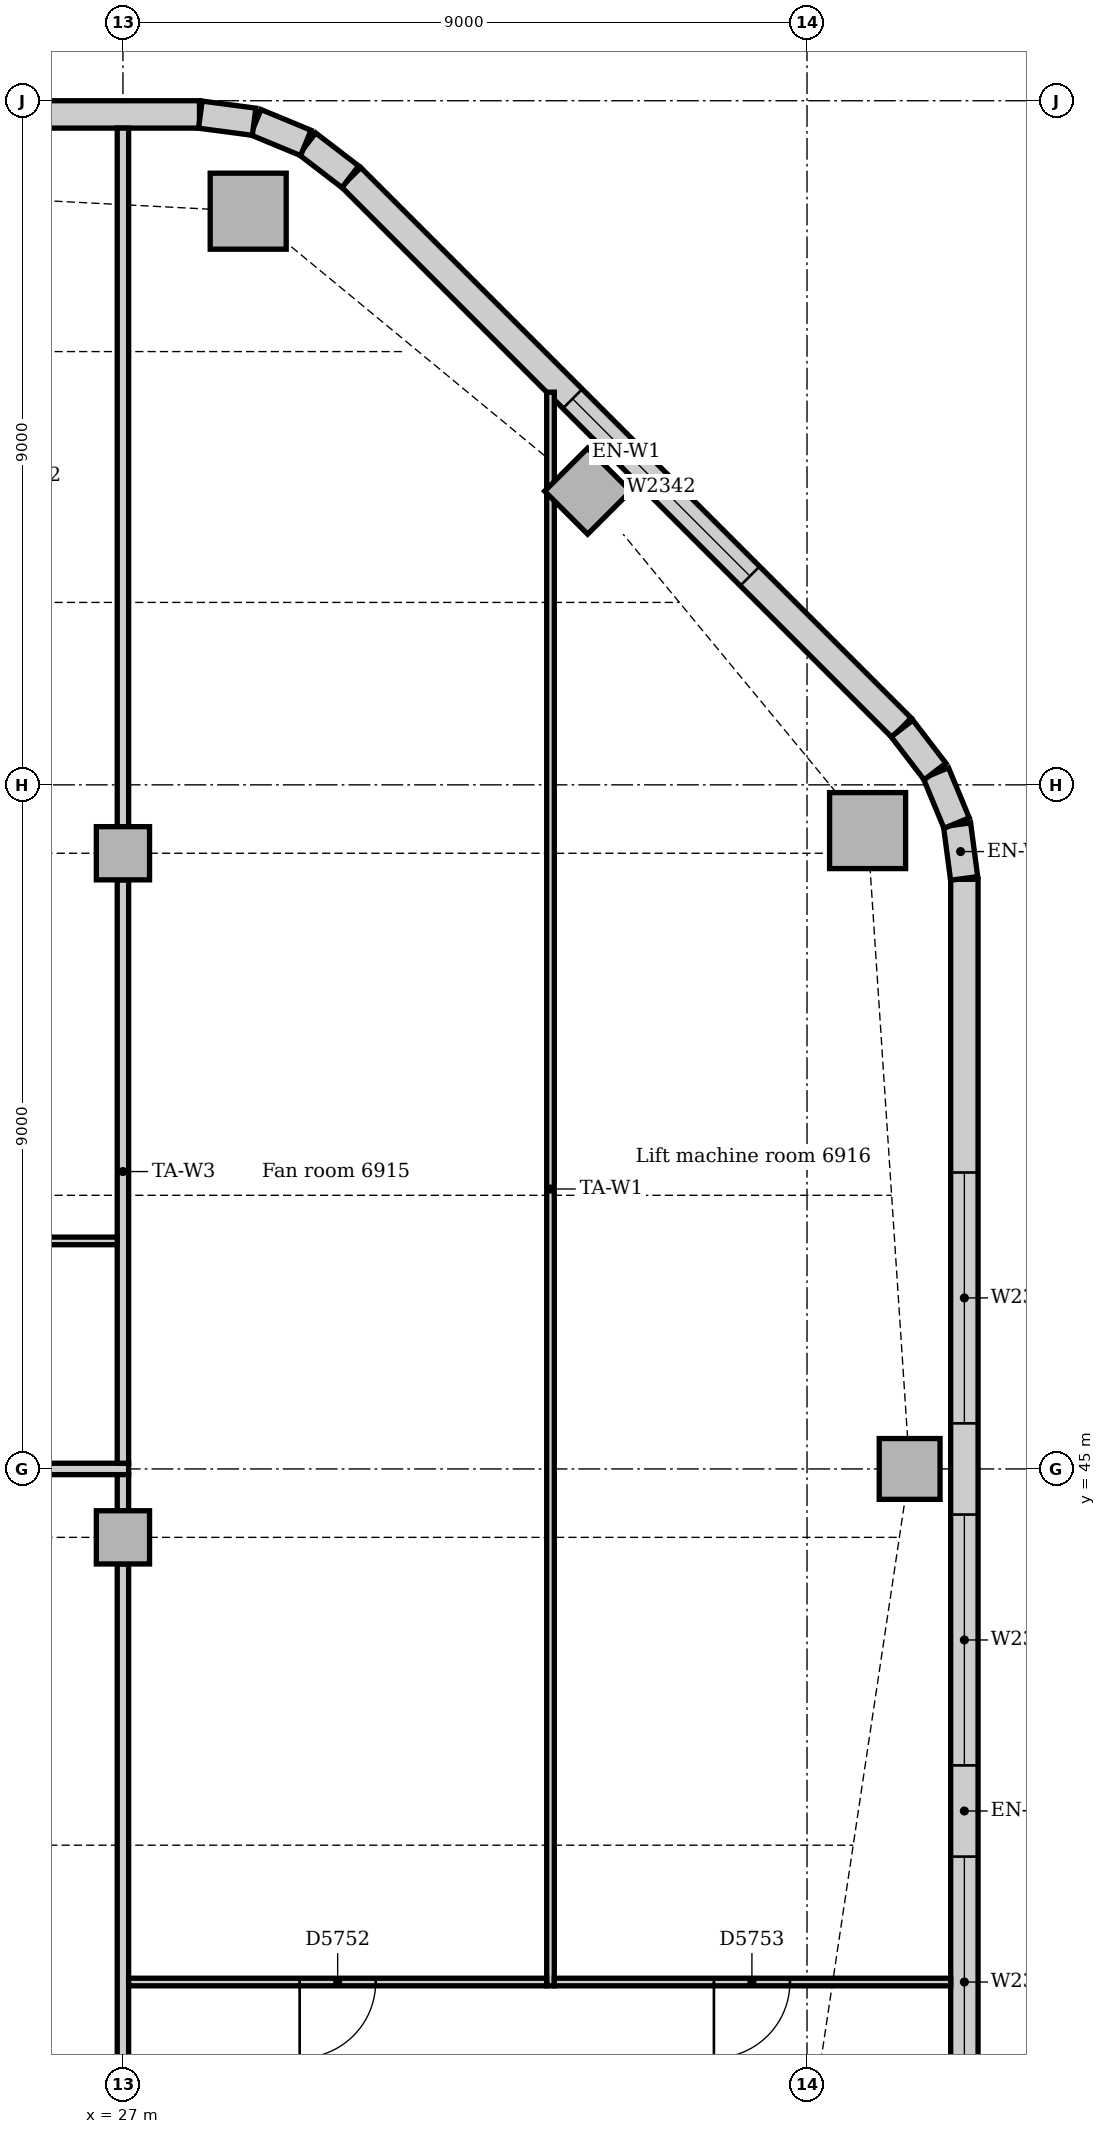
"""IFC4 building model, lengths in metres.
Left out: names, types, materials, properties, quantities, classifications, styles, units other than length and angle.
Written with IfcOpenShell. Run it as: python <this file> out.ifc"""

import sys

from ifc_helpers import new_model, si_unit, direction, frame, frame_2d, origin, origin_2d, place, context, subcontext, project, spatial, rectangle, extrude, element, fill, save


model = new_model("IFC4")
c1 = context("Model", 3, precision=1e-05, world=origin(), true_north=direction((0.0, 1.0)))
c2 = subcontext(c1, "Body", "Model", "MODEL_VIEW")
j1 = project(units=[si_unit("LENGTHUNIT", "METRE"), si_unit("PLANEANGLEUNIT", "RADIAN")], contexts=[c1])
p1 = place(None, origin())
s1 = spatial("IfcSite", under=j1, at=p1, CompositionType="ELEMENT")
p2 = place(p1, origin())
s2 = spatial("IfcBuilding", under=s1, at=p2, CompositionType="ELEMENT")
p3 = place(p2, frame((0.0, 0.0, 291.0)))
s3 = spatial("IfcBuildingStorey", under=s2, at=p3, CompositionType="ELEMENT", Elevation=291.0)
for number, where, z_axis, x_axis in (
    (1, (36.797, 53.398, 0.0), (0.0, 0.0, 1.0), (1.0, 0.0, 0.0)),
    (2, (28.648, 61.547, 0.0), (0.0, 0.0, 1.0), (1.0, 0.0, 0.0)),
):
    element("IfcColumn", number, at=place(p3, frame(where, z_axis=z_axis, x_axis=x_axis)), inside=s3, PredefinedType="COLUMN", context=c2, shape_type="SweptSolid", body=[
        extrude(rectangle(XDim=1.0, YDim=1.0, at=origin_2d()), origin(), (0.0, 0.0, 1.0), 6.55),
    ])
for number, where, z_axis, x_axis in (
    (3, (37.35, 45.0, 0.0), (0.0, 0.0, 1.0), (1.0, 0.0, 0.0)),
    (4, (33.114, 57.864, 0.0), (0.0, 0.0, 1.0), (0.707, 0.707, 0.0)),
):
    element("IfcColumn", number, at=place(p3, frame(where, z_axis=z_axis, x_axis=x_axis)), inside=s3, PredefinedType="COLUMN", context=c2, shape_type="SweptSolid", body=[
        extrude(rectangle(XDim=0.8, YDim=0.8, at=origin_2d()), origin(), (0.0, 0.0, 1.0), 6.55),
    ])
for number, where, z_axis, x_axis in (
    (5, (27.0, 44.1, 0.0), (0.0, 0.0, 1.0), (1.0, 0.0, 0.0)),
    (6, (27.0, 53.1, 0.0), (0.0, 0.0, 1.0), (1.0, 0.0, 0.0)),
):
    element("IfcColumn", number, at=place(p3, frame(where, z_axis=z_axis, x_axis=x_axis)), inside=s3, PredefinedType="COLUMN", context=c2, shape_type="SweptSolid", body=[
        extrude(rectangle(XDim=0.7, YDim=0.7, at=origin_2d()), origin(), (0.0, 0.0, 1.0), 6.55),
    ])
p4 = place(p3, frame((38.07, 28.243, 0.0), z_axis=(0.0, 0.0, 1.0), x_axis=(0.0, 1.0, 0.0)))
e7 = element("IfcWall", 7, at=p4, inside=s3, PredefinedType="STANDARD", context=c2, shape_type="SweptSolid", body=[
    extrude(rectangle(XDim=24.515, YDim=0.36, at=frame_2d((12.257, 0.0))), origin(), (0.0, 0.0, 1.0), 6.55),
])
p5 = place(p4, frame((3.857, 0.0, 0.9)))
e8 = element("IfcOpeningElement", 8, at=p5, cuts=e7, PredefinedType="OPENING", context=c2, shape_type="SweptSolid", body=[
    extrude(rectangle(XDim=3.3, YDim=2.2, at=frame_2d((1.65, 1.1))), frame((0.0, 0.19, 0.0), z_axis=(0.0, -1.0, 0.0), x_axis=(1.0, 0.0, 0.0)), (0.0, 0.0, 1.0), 0.38),
])
p6 = place(p4, frame((8.357, 0.0, 0.9)))
e9 = element("IfcOpeningElement", 9, at=p6, cuts=e7, PredefinedType="OPENING", context=c2, shape_type="SweptSolid", body=[
    extrude(rectangle(XDim=3.3, YDim=2.2, at=frame_2d((1.65, 1.1))), frame((0.0, 0.19, 0.0), z_axis=(0.0, -1.0, 0.0), x_axis=(1.0, 0.0, 0.0)), (0.0, 0.0, 1.0), 0.38),
])
p7 = place(p4, frame((12.857, 0.0, 0.9)))
e10 = element("IfcOpeningElement", 10, at=p7, cuts=e7, PredefinedType="OPENING", context=c2, shape_type="SweptSolid", body=[
    extrude(rectangle(XDim=3.3, YDim=2.2, at=frame_2d((1.65, 1.1))), frame((0.0, 0.19, 0.0), z_axis=(0.0, -1.0, 0.0), x_axis=(1.0, 0.0, 0.0)), (0.0, 0.0, 1.0), 0.38),
])
p8 = place(p4, frame((17.357, 0.0, 0.9)))
e11 = element("IfcOpeningElement", 11, at=p8, cuts=e7, PredefinedType="OPENING", context=c2, shape_type="SweptSolid", body=[
    extrude(rectangle(XDim=3.3, YDim=2.2, at=frame_2d((1.65, 1.1))), frame((0.0, 0.19, 0.0), z_axis=(0.0, -1.0, 0.0), x_axis=(1.0, 0.0, 0.0)), (0.0, 0.0, 1.0), 0.38),
])
p9 = place(p3, frame((37.244, 54.751, 0.0), z_axis=(0.0, 0.0, 1.0), x_axis=(-0.707106781187, 0.707106781187, 0.0)))
e12 = element("IfcWall", 12, at=p9, inside=s3, PredefinedType="STANDARD", context=c2, shape_type="SweptSolid", body=[
    extrude(rectangle(XDim=10.243, YDim=0.36, at=frame_2d((5.121, 0.0))), origin(), (0.0, 0.0, 1.0), 6.55),
])
p10 = place(p9, frame((2.821, 0.0, 0.9)))
e13 = element("IfcOpeningElement", 13, at=p10, cuts=e12, PredefinedType="OPENING", context=c2, shape_type="SweptSolid", body=[
    extrude(rectangle(XDim=3.3, YDim=2.2, at=frame_2d((1.65, 1.1))), frame((0.0, 0.19, 0.0), z_axis=(0.0, -1.0, 0.0), x_axis=(1.0, 0.0, 0.0)), (0.0, 0.0, 1.0), 0.38),
])
p11 = place(p3, frame((28.007, 62.82, 0.0), z_axis=(0.0, 0.0, 1.0), x_axis=(-1.0, 0.0, 0.0)))
e14 = element("IfcWall", 14, at=p11, inside=s3, PredefinedType="STANDARD", context=c2, shape_type="SweptSolid", body=[
    extrude(rectangle(XDim=23.765, YDim=0.36, at=frame_2d((11.882, 0.0))), origin(), (0.0, 0.0, 1.0), 6.55),
])
p12 = place(p11, frame((3.532, 0.0, 0.9)))
e15 = element("IfcOpeningElement", 15, at=p12, cuts=e14, PredefinedType="OPENING", context=c2, shape_type="SweptSolid", body=[
    extrude(rectangle(XDim=1.8, YDim=2.2, at=frame_2d((0.9, 1.1))), frame((0.0, 0.19, 0.0), z_axis=(0.0, -1.0, 0.0), x_axis=(1.0, 0.0, 0.0)), (0.0, 0.0, 1.0), 0.38),
])
p13 = place(p11, frame((7.982, 0.0, 0.9)))
e16 = element("IfcOpeningElement", 16, at=p13, cuts=e14, PredefinedType="OPENING", context=c2, shape_type="SweptSolid", body=[
    extrude(rectangle(XDim=3.3, YDim=2.2, at=frame_2d((1.65, 1.1))), frame((0.0, 0.19, 0.0), z_axis=(0.0, -1.0, 0.0), x_axis=(1.0, 0.0, 0.0)), (0.0, 0.0, 1.0), 0.38),
])
p14 = place(p11, frame((12.532, 0.0, 0.9)))
e17 = element("IfcOpeningElement", 17, at=p14, cuts=e14, PredefinedType="OPENING", context=c2, shape_type="SweptSolid", body=[
    extrude(rectangle(XDim=1.8, YDim=2.2, at=frame_2d((0.9, 1.1))), frame((0.0, 0.19, 0.0), z_axis=(0.0, -1.0, 0.0), x_axis=(1.0, 0.0, 0.0)), (0.0, 0.0, 1.0), 0.38),
])
p15 = place(p11, frame((16.982, 0.0, 0.9)))
e18 = element("IfcOpeningElement", 18, at=p15, cuts=e14, PredefinedType="OPENING", context=c2, shape_type="SweptSolid", body=[
    extrude(rectangle(XDim=3.3, YDim=2.2, at=frame_2d((1.65, 1.1))), frame((0.0, 0.19, 0.0), z_axis=(0.0, -1.0, 0.0), x_axis=(1.0, 0.0, 0.0)), (0.0, 0.0, 1.0), 0.38),
])
for number, where, z_axis, x_axis in (
    (19, (38.067, 52.769, 0.0), (0.0, 0.0, 1.0), (-0.131, 0.991, 0.0)),
    (20, (37.968, 53.497, 0.0), (0.0, 0.0, 1.0), (-0.383, 0.924, 0.0)),
):
    element("IfcWall", number, at=place(p3, frame(where, z_axis=z_axis, x_axis=x_axis)), inside=s3, PredefinedType="STANDARD", context=c2, shape_type="SweptSolid", body=[
        extrude(rectangle(XDim=0.713, YDim=0.36, at=frame_2d((0.356, 0.0))), origin(), (0.0, 0.0, 1.0), 6.55),
    ])
for number, where, z_axis, x_axis in (
    (21, (37.684, 54.175, 0.0), (0.0, 0.0, 1.0), (-0.609, 0.793, 0.0)),
    (22, (29.991, 62.0, 0.0), (0.0, 0.0, 1.0), (-0.793, 0.609, 0.0)),
):
    element("IfcWall", number, at=place(p3, frame(where, z_axis=z_axis, x_axis=x_axis)), inside=s3, PredefinedType="STANDARD", context=c2, shape_type="SweptSolid", body=[
        extrude(rectangle(XDim=0.713, YDim=0.36, at=frame_2d((0.357, 0.0))), origin(), (0.0, 0.0, 1.0), 6.55),
    ])
for number, where, z_axis, x_axis in (
    (23, (29.406, 62.445, 0.0), (0.0, 0.0, 1.0), (-0.924, 0.383, 0.0)),
    (24, (28.726, 62.724, 0.0), (0.0, 0.0, 1.0), (-0.991, 0.131, 0.0)),
):
    element("IfcWall", number, at=place(p3, frame(where, z_axis=z_axis, x_axis=x_axis)), inside=s3, PredefinedType="STANDARD", context=c2, shape_type="SweptSolid", body=[
        extrude(rectangle(XDim=0.713, YDim=0.36, at=frame_2d((0.356, 0.0))), origin(), (0.0, 0.0, 1.0), 6.55),
    ])
p16 = place(p3, frame((0.36, 45.0, 0.0), z_axis=(0.0, 0.0, 1.0), x_axis=(1.0, 0.0, 0.0)))
e25 = element("IfcWall", 25, at=p16, inside=s3, PredefinedType="PARTITIONING", context=c2, shape_type="SweptSolid", body=[
    extrude(rectangle(XDim=26.715, YDim=0.15, at=frame_2d((13.357, 0.0))), origin(), (0.0, 0.0, 1.0), 6.55),
])
p17 = place(p16, frame((6.15, 0.0, 0.0)))
e26 = element("IfcOpeningElement", 26, at=p17, cuts=e25, PredefinedType="OPENING", context=c2, shape_type="SweptSolid", body=[
    extrude(rectangle(XDim=1.0, YDim=2.1, at=frame_2d((0.5, 1.05))), frame((0.0, 0.085, 0.0), z_axis=(0.0, -1.0, 0.0), x_axis=(1.0, 0.0, 0.0)), (0.0, 0.0, 1.0), 0.17),
])
p18 = place(p16, frame((16.29, 0.0, 0.0)))
e27 = element("IfcOpeningElement", 27, at=p18, cuts=e25, PredefinedType="OPENING", context=c2, shape_type="SweptSolid", body=[
    extrude(rectangle(XDim=1.0, YDim=2.1, at=frame_2d((0.5, 1.05))), frame((0.0, 0.085, 0.0), z_axis=(0.0, -1.0, 0.0), x_axis=(1.0, 0.0, 0.0)), (0.0, 0.0, 1.0), 0.17),
])
p19 = place(p16, frame((23.84, 0.0, 0.0)))
e28 = element("IfcOpeningElement", 28, at=p19, cuts=e25, PredefinedType="OPENING", context=c2, shape_type="SweptSolid", body=[
    extrude(rectangle(XDim=1.0, YDim=2.1, at=frame_2d((0.5, 1.05))), frame((0.0, 0.085, 0.0), z_axis=(0.0, -1.0, 0.0), x_axis=(1.0, 0.0, 0.0)), (0.0, 0.0, 1.0), 0.17),
])
p20 = place(p3, frame((27.0, 36.35, 0.0), z_axis=(0.0, 0.0, 1.0), x_axis=(0.0, 1.0, 0.0)))
e29 = element("IfcWall", 29, at=p20, inside=s3, PredefinedType="PARTITIONING", context=c2, shape_type="SweptSolid", body=[
    extrude(rectangle(XDim=7.4, YDim=0.15, at=frame_2d((3.7, 0.0))), origin(), (0.0, 0.0, 1.0), 6.1),
])
p21 = place(p3, frame((27.0, 44.45, 0.0), z_axis=(0.0, 0.0, 1.0), x_axis=(0.0, 1.0, 0.0)))
e30 = element("IfcWall", 30, at=p21, inside=s3, PredefinedType="PARTITIONING", context=c2, shape_type="SweptSolid", body=[
    extrude(rectangle(XDim=0.475, YDim=0.15, at=frame_2d((0.237, 0.0))), origin(), (0.0, 0.0, 1.0), 6.55),
])
p22 = place(p3, frame((27.0, 45.075, 0.0), z_axis=(0.0, 0.0, 1.0), x_axis=(0.0, 1.0, 0.0)))
e31 = element("IfcWall", 31, at=p22, inside=s3, PredefinedType="PARTITIONING", context=c2, shape_type="SweptSolid", body=[
    extrude(rectangle(XDim=7.675, YDim=0.15, at=frame_2d((3.837, 0.0))), origin(), (0.0, 0.0, 1.0), 6.1),
])
p23 = place(p3, frame((27.0, 53.45, 0.0), z_axis=(0.0, 0.0, 1.0), x_axis=(0.0, 1.0, 0.0)))
e32 = element("IfcWall", 32, at=p23, inside=s3, PredefinedType="PARTITIONING", context=c2, shape_type="SweptSolid", body=[
    extrude(rectangle(XDim=9.19, YDim=0.15, at=frame_2d((4.595, 0.0))), origin(), (0.0, 0.0, 1.0), 6.1),
])
p24 = place(p3, frame((32.625, 38.2, 0.0), z_axis=(0.0, 0.0, 1.0), x_axis=(0.0, 1.0, 0.0)))
e33 = element("IfcWall", 33, at=p24, inside=s3, PredefinedType="PARTITIONING", context=c2, shape_type="SweptSolid", body=[
    extrude(rectangle(XDim=20.966, YDim=0.1, at=frame_2d((10.483, 0.0))), origin(), (0.0, 0.0, 1.0), 6.55),
])
p25 = place(p3, frame((27.075, 38.25, 0.0), z_axis=(0.0, 0.0, 1.0), x_axis=(1.0, 0.0, 0.0)))
e34 = element("IfcWall", 34, at=p25, inside=s3, PredefinedType="PARTITIONING", context=c2, shape_type="SweptSolid", body=[
    extrude(rectangle(XDim=5.5, YDim=0.1, at=frame_2d((2.75, 0.0))), origin(), (0.0, 0.0, 1.0), 6.55),
])
p26 = place(p25, frame((2.25, 0.0, 0.0)))
e35 = element("IfcOpeningElement", 35, at=p26, cuts=e34, PredefinedType="OPENING", context=c2, shape_type="SweptSolid", body=[
    extrude(rectangle(XDim=1.0, YDim=2.1, at=frame_2d((0.5, 1.05))), frame((0.0, 0.06, 0.0), z_axis=(0.0, -1.0, 0.0), x_axis=(1.0, 0.0, 0.0)), (0.0, 0.0, 1.0), 0.12),
])
p27 = place(p3, frame((32.675, 38.25, 0.0), z_axis=(0.0, 0.0, 1.0), x_axis=(1.0, 0.0, 0.0)))
e36 = element("IfcWall", 36, at=p27, inside=s3, PredefinedType="PARTITIONING", context=c2, shape_type="SweptSolid", body=[
    extrude(rectangle(XDim=5.215, YDim=0.1, at=frame_2d((2.607, 0.0))), origin(), (0.0, 0.0, 1.0), 6.55),
])
p28 = place(p27, frame((2.1, 0.0, 0.0)))
e37 = element("IfcOpeningElement", 37, at=p28, cuts=e36, PredefinedType="OPENING", context=c2, shape_type="SweptSolid", body=[
    extrude(rectangle(XDim=1.0, YDim=2.1, at=frame_2d((0.5, 1.05))), frame((0.0, 0.06, 0.0), z_axis=(0.0, -1.0, 0.0), x_axis=(1.0, 0.0, 0.0)), (0.0, 0.0, 1.0), 0.12),
])
p29 = place(p3, frame((22.55, 48.0, 0.0), z_axis=(0.0, 0.0, 1.0), x_axis=(1.0, 0.0, 0.0)))
e38 = element("IfcWall", 38, at=p29, inside=s3, PredefinedType="PARTITIONING", context=c2, shape_type="SweptSolid", body=[
    extrude(rectangle(XDim=4.375, YDim=0.1, at=frame_2d((2.188, 0.0))), origin(), (0.0, 0.0, 1.0), 6.55),
])
p30 = place(p29, frame((1.7, 0.0, 0.0)))
e39 = element("IfcOpeningElement", 39, at=p30, cuts=e38, PredefinedType="OPENING", context=c2, shape_type="SweptSolid", body=[
    extrude(rectangle(XDim=1.0, YDim=2.1, at=frame_2d((0.5, 1.05))), frame((0.0, 0.06, 0.0), z_axis=(0.0, -1.0, 0.0), x_axis=(1.0, 0.0, 0.0)), (0.0, 0.0, 1.0), 0.12),
])
p31 = place(p6, origin())
e40 = element("IfcWindow", 40, at=p31, inside=s3, PartitioningType="SINGLE_PANEL", PredefinedType="WINDOW", context=c2, shape_type="SweptSolid", body=[
    extrude(rectangle(XDim=3.3, YDim=2.2, at=frame_2d((1.65, 1.1))), frame((0.0, 0.13, 0.0), z_axis=(0.0, -1.0, 0.0), x_axis=(1.0, 0.0, 0.0)), (0.0, 0.0, 1.0), 0.06),
])
fill(e9, e40)
p32 = place(p7, origin())
e41 = element("IfcWindow", 41, at=p32, inside=s3, PartitioningType="SINGLE_PANEL", PredefinedType="WINDOW", context=c2, shape_type="SweptSolid", body=[
    extrude(rectangle(XDim=3.3, YDim=2.2, at=frame_2d((1.65, 1.1))), frame((0.0, 0.13, 0.0), z_axis=(0.0, -1.0, 0.0), x_axis=(1.0, 0.0, 0.0)), (0.0, 0.0, 1.0), 0.06),
])
fill(e10, e41)
p33 = place(p8, origin())
e42 = element("IfcWindow", 42, at=p33, inside=s3, PartitioningType="SINGLE_PANEL", PredefinedType="WINDOW", context=c2, shape_type="SweptSolid", body=[
    extrude(rectangle(XDim=3.3, YDim=2.2, at=frame_2d((1.65, 1.1))), frame((0.0, 0.13, 0.0), z_axis=(0.0, -1.0, 0.0), x_axis=(1.0, 0.0, 0.0)), (0.0, 0.0, 1.0), 0.06),
])
fill(e11, e42)
p34 = place(p10, origin())
e43 = element("IfcWindow", 43, at=p34, inside=s3, PartitioningType="SINGLE_PANEL", PredefinedType="WINDOW", context=c2, shape_type="SweptSolid", body=[
    extrude(rectangle(XDim=3.3, YDim=2.2, at=frame_2d((1.65, 1.1))), frame((0.0, 0.13, 0.0), z_axis=(0.0, -1.0, 0.0), x_axis=(1.0, 0.0, 0.0)), (0.0, 0.0, 1.0), 0.06),
])
fill(e13, e43)
p35 = place(p26, frame((1.0, 0.0, 0.0), z_axis=(0.0, 0.0, 1.0), x_axis=(-1.0, 0.0, 0.0)))
e44 = element("IfcDoor", 44, at=p35, inside=s3, OperationType="SINGLE_SWING_RIGHT", PredefinedType="DOOR", context=c2, shape_type="SweptSolid", body=[
    extrude(rectangle(XDim=1.0, YDim=2.1, at=frame_2d((0.5, 1.05))), frame((0.0, 0.025, 0.0), z_axis=(0.0, -1.0, 0.0), x_axis=(1.0, 0.0, 0.0)), (0.0, 0.0, 1.0), 0.05),
])
fill(e35, e44)
p36 = place(p28, frame((1.0, 0.0, 0.0), z_axis=(0.0, 0.0, 1.0), x_axis=(-1.0, 0.0, 0.0)))
e45 = element("IfcDoor", 45, at=p36, inside=s3, OperationType="SINGLE_SWING_RIGHT", PredefinedType="DOOR", context=c2, shape_type="SweptSolid", body=[
    extrude(rectangle(XDim=1.0, YDim=2.1, at=frame_2d((0.5, 1.05))), frame((0.0, 0.025, 0.0), z_axis=(0.0, -1.0, 0.0), x_axis=(1.0, 0.0, 0.0)), (0.0, 0.0, 1.0), 0.05),
])
fill(e37, e45)
save(model, sys.argv[1])
